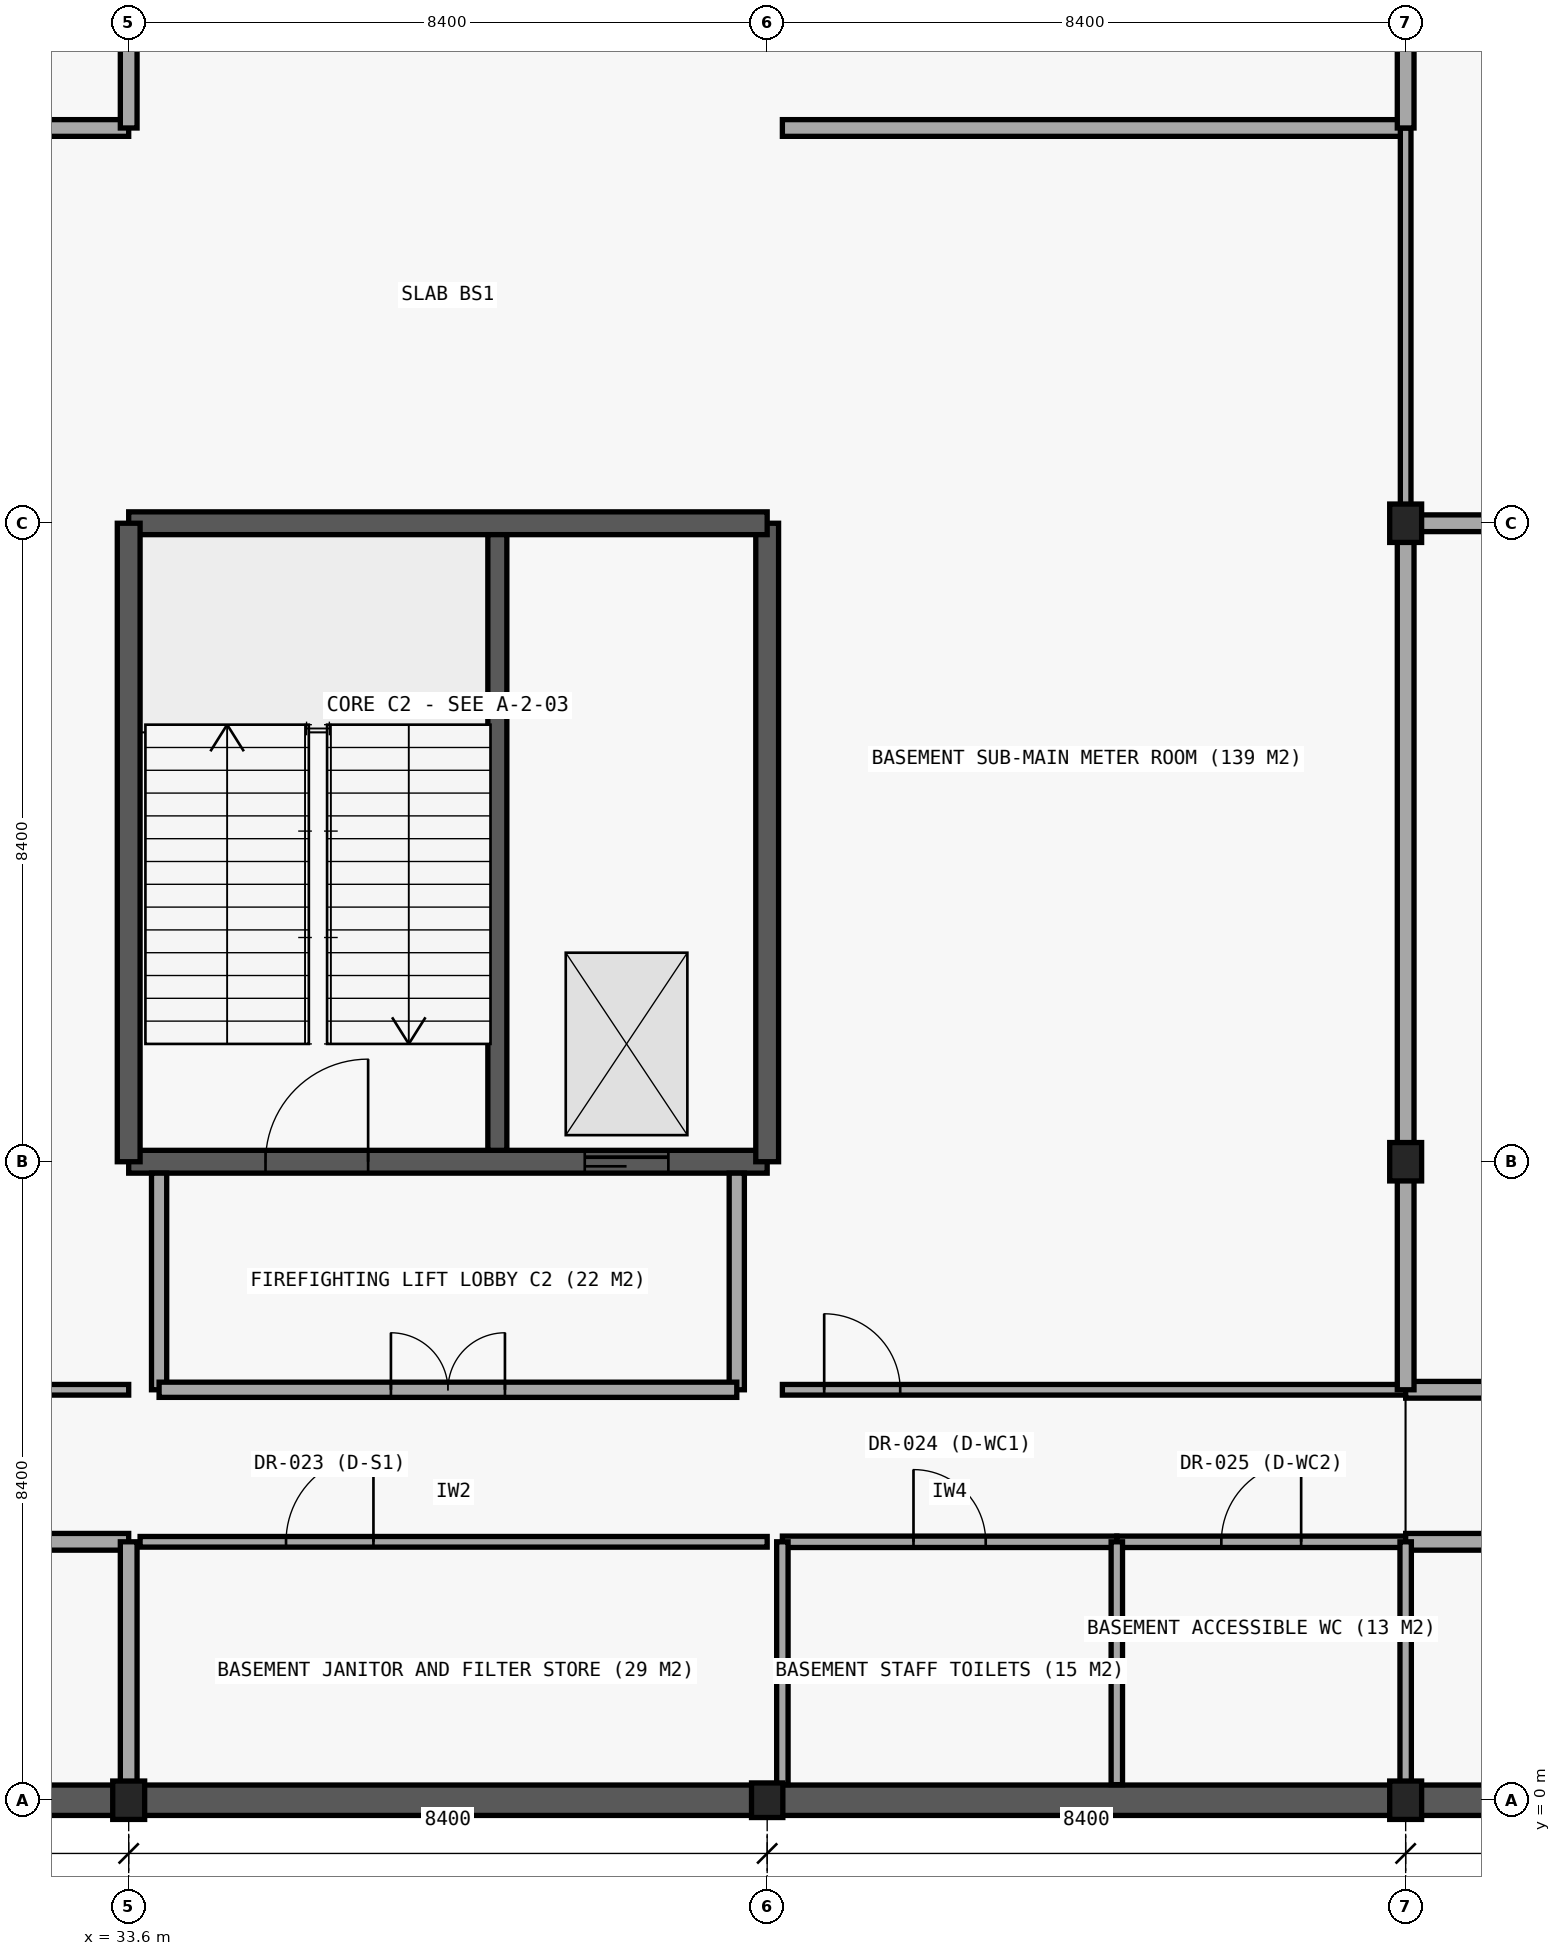
"""IFC4 building model, lengths in metres.
Left out: names, types, materials, properties, quantities, classifications, styles, units other than length and angle.
Written with IfcOpenShell. Run it as: python <this file> out.ifc"""

import sys

from ifc_helpers import new_model, si_unit, direction, frame, frame_2d, origin, origin_2d, place, context, subcontext, project, spatial, rectangle, i_section, extrude, element, fill, save


model = new_model("IFC4")
c1 = context("Model", 3, precision=1e-05, world=origin(), true_north=direction((0.0, 1.0)))
c2 = subcontext(c1, "Body", "Model", "MODEL_VIEW")
j1 = project(units=[si_unit("LENGTHUNIT", "METRE"), si_unit("PLANEANGLEUNIT", "RADIAN")], contexts=[c1])
p1 = place(None, origin())
s1 = spatial("IfcSite", under=j1, at=p1, CompositionType="ELEMENT")
p2 = place(p1, origin())
s2 = spatial("IfcBuilding", under=s1, at=p2, CompositionType="ELEMENT")
p3 = place(p2, frame((0.0, 0.0, -4.5)))
s3 = spatial("IfcBuildingStorey", under=s2, at=p3, CompositionType="ELEMENT", Elevation=-4.5)
p4 = place(p3, frame((33.6, 8.4, -0.35), z_axis=(0.0, 0.0, 1.0), x_axis=(1.0, 0.0, 0.0)))
e1 = element("IfcWall", 1, at=p4, inside=s3, PredefinedType="SHEAR", context=c2, shape_type="SweptSolid", body=[
    extrude(rectangle(XDim=8.4, YDim=0.3, at=frame_2d((4.2, 0.0))), origin(), (0.0, 0.0, 1.0), 4.85),
])
p5 = place(p4, frame((1.8, 0.0, 0.35)))
e2 = element("IfcOpeningElement", 2, at=p5, cuts=e1, PredefinedType="OPENING", context=c2, shape_type="SweptSolid", body=[
    extrude(rectangle(XDim=1.35, YDim=2.2, at=frame_2d((0.675, 1.1))), frame((0.0, 0.16, 0.0), z_axis=(0.0, -1.0, 0.0), x_axis=(1.0, 0.0, 0.0)), (0.0, 0.0, 1.0), 0.32),
])
p6 = place(p4, frame((6.0, 0.0, 0.35)))
e3 = element("IfcOpeningElement", 3, at=p6, cuts=e1, PredefinedType="OPENING", context=c2, shape_type="SweptSolid", body=[
    extrude(rectangle(XDim=1.1, YDim=2.2, at=frame_2d((0.55, 1.1))), frame((0.0, 0.16, 0.0), z_axis=(0.0, -1.0, 0.0), x_axis=(1.0, 0.0, 0.0)), (0.0, 0.0, 1.0), 0.32),
])
p7 = place(p3, frame((42.0, 8.4, -0.35), z_axis=(0.0, 0.0, 1.0), x_axis=(0.0, 1.0, 0.0)))
e4 = element("IfcWall", 4, at=p7, inside=s3, PredefinedType="SHEAR", context=c2, shape_type="SweptSolid", body=[
    extrude(rectangle(XDim=8.4, YDim=0.3, at=frame_2d((4.2, 0.0))), origin(), (0.0, 0.0, 1.0), 4.85),
])
p8 = place(p3, frame((42.0, 16.8, -0.35), z_axis=(0.0, 0.0, 1.0), x_axis=(-1.0, 0.0, 0.0)))
e5 = element("IfcWall", 5, at=p8, inside=s3, PredefinedType="SHEAR", context=c2, shape_type="SweptSolid", body=[
    extrude(rectangle(XDim=8.4, YDim=0.3, at=frame_2d((4.2, 0.0))), origin(), (0.0, 0.0, 1.0), 4.85),
])
p9 = place(p3, frame((33.6, 16.8, -0.35), z_axis=(0.0, 0.0, 1.0), x_axis=(0.0, -1.0, 0.0)))
e6 = element("IfcWall", 6, at=p9, inside=s3, PredefinedType="SHEAR", context=c2, shape_type="SweptSolid", body=[
    extrude(rectangle(XDim=8.4, YDim=0.3, at=frame_2d((4.2, 0.0))), origin(), (0.0, 0.0, 1.0), 4.85),
])
p10 = place(p3, frame((38.45, 8.55, -0.35), z_axis=(0.0, 0.0, 1.0), x_axis=(0.0, 1.0, 0.0)))
e7 = element("IfcWall", 7, at=p10, inside=s3, PredefinedType="SHEAR", context=c2, shape_type="SweptSolid", body=[
    extrude(rectangle(XDim=8.1, YDim=0.25, at=frame_2d((4.05, 0.0))), origin(), (0.0, 0.0, 1.0), 4.85),
])
p11 = place(p3, frame((25.2, 0.0, -0.35), z_axis=(0.0, 0.0, 1.0), x_axis=(1.0, 0.0, 0.0)))
e8 = element("IfcWall", 8, at=p11, inside=s3, PredefinedType="SOLIDWALL", context=c2, shape_type="SweptSolid", body=[
    extrude(rectangle(XDim=8.4, YDim=0.4, at=frame_2d((4.2, 0.0))), origin(), (0.0, 0.0, 1.0), 4.6),
])
for number, where, z_axis, x_axis in (
    (9, (33.6, 0.0, -0.35), (0.0, 0.0, 1.0), (1.0, 0.0, 0.0)),
    (10, (42.0, 0.0, -0.35), (0.0, 0.0, 1.0), (1.0, 0.0, 0.0)),
):
    element("IfcWall", number, at=place(p3, frame(where, z_axis=z_axis, x_axis=x_axis)), inside=s3, PredefinedType="SOLIDWALL", context=c2, shape_type="SweptSolid", body=[
        extrude(rectangle(XDim=8.4, YDim=0.4, at=frame_2d((4.2, 0.0))), origin(), (0.0, 0.0, 1.0), 4.6),
    ])
p12 = place(p3, frame((50.4, 0.0, -0.35), z_axis=(0.0, 0.0, 1.0), x_axis=(1.0, 0.0, 0.0)))
e11 = element("IfcWall", 11, at=p12, inside=s3, PredefinedType="SOLIDWALL", context=c2, shape_type="SweptSolid", body=[
    extrude(rectangle(XDim=8.4, YDim=0.4, at=frame_2d((4.2, 0.0))), origin(), (0.0, 0.0, 1.0), 4.6),
])
p13 = place(p3, frame((33.6, 0.0, -0.35), z_axis=(0.0, 0.0, 1.0), x_axis=(1.0, 0.0, 0.0)))
e12 = element("IfcColumn", 12, at=p13, inside=s3, PredefinedType="COLUMN", context=c2, shape_type="SweptSolid", body=[
    extrude(i_section(OverallWidth=0.42, OverallDepth=0.505, WebThickness=0.037, FlangeThickness=0.059, FilletRadius=0.015, at=origin_2d()), origin(), (0.0, 0.0, 1.0), 4.85),
])
p14 = place(p3, frame((42.0, 0.0, -0.35), z_axis=(0.0, 0.0, 1.0), x_axis=(1.0, 0.0, 0.0)))
e13 = element("IfcColumn", 13, at=p14, inside=s3, PredefinedType="COLUMN", context=c2, shape_type="SweptSolid", body=[
    extrude(i_section(OverallWidth=0.412, OverallDepth=0.455, WebThickness=0.031, FlangeThickness=0.049, FilletRadius=0.015, at=origin_2d()), origin(), (0.0, 0.0, 1.0), 4.85),
])
for number, where, z_axis, x_axis in (
    (14, (50.4, 0.0, -0.35), (0.0, 0.0, 1.0), (1.0, 0.0, 0.0)),
    (15, (50.4, 8.4, -0.35), (0.0, 0.0, 1.0), (1.0, 0.0, 0.0)),
    (16, (50.4, 16.8, -0.35), (0.0, 0.0, 1.0), (1.0, 0.0, 0.0)),
):
    element("IfcColumn", number, at=place(p3, frame(where, z_axis=z_axis, x_axis=x_axis)), inside=s3, PredefinedType="COLUMN", context=c2, shape_type="SweptSolid", body=[
        extrude(i_section(OverallWidth=0.42, OverallDepth=0.505, WebThickness=0.037, FlangeThickness=0.059, FilletRadius=0.015, at=origin_2d()), origin(), (0.0, 0.0, 1.0), 4.85),
    ])
for number, where, z_axis, x_axis in (
    (17, (34.0, 5.4, 0.0), (0.0, 0.0, 1.0), (0.0, 1.0, 0.0)),
    (18, (41.6, 5.4, 0.0), (0.0, 0.0, 1.0), (0.0, 1.0, 0.0)),
):
    element("IfcWall", number, at=place(p3, frame(where, z_axis=z_axis, x_axis=x_axis)), inside=s3, PredefinedType="PARTITIONING", context=c2, shape_type="SweptSolid", body=[
        extrude(rectangle(XDim=2.85, YDim=0.2, at=frame_2d((1.425, 0.0))), origin(), (0.0, 0.0, 1.0), 3.75),
    ])
p15 = place(p3, frame((34.0, 5.4, 0.0), z_axis=(0.0, 0.0, 1.0), x_axis=(1.0, 0.0, 0.0)))
e19 = element("IfcWall", 19, at=p15, inside=s3, PredefinedType="PARTITIONING", context=c2, shape_type="SweptSolid", body=[
    extrude(rectangle(XDim=7.6, YDim=0.2, at=frame_2d((3.8, 0.0))), origin(), (0.0, 0.0, 1.0), 3.82),
])
p16 = place(p15, frame((3.05, 0.0, 0.0)))
e20 = element("IfcOpeningElement", 20, at=p16, cuts=e19, PredefinedType="OPENING", context=c2, shape_type="SweptSolid", body=[
    extrude(rectangle(XDim=1.5, YDim=2.2, at=frame_2d((0.75, 1.1))), frame((0.0, 0.11, 0.0), z_axis=(0.0, -1.0, 0.0), x_axis=(1.0, 0.0, 0.0)), (0.0, 0.0, 1.0), 0.22),
])
p17 = place(p3, frame((20.0, 3.4, 0.0), z_axis=(0.0, 0.0, 1.0), x_axis=(1.0, 0.0, 0.0)))
e21 = element("IfcWall", 21, at=p17, inside=s3, PredefinedType="PARTITIONING", context=c2, shape_type="SweptSolid", body=[
    extrude(rectangle(XDim=13.6, YDim=0.22, at=frame_2d((6.8, 0.0))), origin(), (0.0, 0.0, 1.0), 3.8),
])
p18 = place(p17, frame((6.175, 0.0, 0.0)))
e22 = element("IfcOpeningElement", 22, at=p18, cuts=e21, PredefinedType="OPENING", context=c2, shape_type="SweptSolid", body=[
    extrude(rectangle(XDim=1.25, YDim=2.2, at=frame_2d((0.625, 1.1))), frame((0.0, 0.12, 0.0), z_axis=(0.0, -1.0, 0.0), x_axis=(1.0, 0.0, 0.0)), (0.0, 0.0, 1.0), 0.24),
])
p19 = place(p3, frame((33.75, 3.4, 0.0), z_axis=(0.0, 0.0, 1.0), x_axis=(1.0, 0.0, 0.0)))
e23 = element("IfcWall", 23, at=p19, inside=s3, PredefinedType="PARTITIONING", context=c2, shape_type="SweptSolid", body=[
    extrude(rectangle(XDim=8.25, YDim=0.14, at=frame_2d((4.125, 0.0))), origin(), (0.0, 0.0, 1.0), 3.8),
])
p20 = place(p19, frame((1.92, 0.0, 0.0)))
e24 = element("IfcOpeningElement", 24, at=p20, cuts=e23, PredefinedType="OPENING", context=c2, shape_type="SweptSolid", body=[
    extrude(rectangle(XDim=1.15, YDim=2.15, at=frame_2d((0.575, 1.075))), frame((0.0, 0.08, 0.0), z_axis=(0.0, -1.0, 0.0), x_axis=(1.0, 0.0, 0.0)), (0.0, 0.0, 1.0), 0.16),
])
p21 = place(p3, frame((42.2, 3.4, 0.0), z_axis=(0.0, 0.0, 1.0), x_axis=(1.0, 0.0, 0.0)))
e25 = element("IfcWall", 25, at=p21, inside=s3, PredefinedType="PARTITIONING", context=c2, shape_type="SweptSolid", body=[
    extrude(rectangle(XDim=4.4, YDim=0.15, at=frame_2d((2.2, 0.0))), origin(), (0.0, 0.0, 1.0), 3.8),
])
p22 = place(p21, frame((1.725, 0.0, 0.0)))
e26 = element("IfcOpeningElement", 26, at=p22, cuts=e25, PredefinedType="OPENING", context=c2, shape_type="SweptSolid", body=[
    extrude(rectangle(XDim=0.95, YDim=2.1, at=frame_2d((0.475, 1.05))), frame((0.0, 0.085, 0.0), z_axis=(0.0, -1.0, 0.0), x_axis=(1.0, 0.0, 0.0)), (0.0, 0.0, 1.0), 0.17),
])
p23 = place(p3, frame((46.6, 3.4, 0.0), z_axis=(0.0, 0.0, 1.0), x_axis=(1.0, 0.0, 0.0)))
e27 = element("IfcWall", 27, at=p23, inside=s3, PredefinedType="PARTITIONING", context=c2, shape_type="SweptSolid", body=[
    extrude(rectangle(XDim=3.8, YDim=0.15, at=frame_2d((1.9, 0.0))), origin(), (0.0, 0.0, 1.0), 3.8),
])
p24 = place(p23, frame((1.375, 0.0, 0.0)))
e28 = element("IfcOpeningElement", 28, at=p24, cuts=e27, PredefinedType="OPENING", context=c2, shape_type="SweptSolid", body=[
    extrude(rectangle(XDim=1.05, YDim=2.15, at=frame_2d((0.525, 1.075))), frame((0.0, 0.085, 0.0), z_axis=(0.0, -1.0, 0.0), x_axis=(1.0, 0.0, 0.0)), (0.0, 0.0, 1.0), 0.17),
])
p25 = place(p3, frame((50.4, 3.4, 0.0), z_axis=(0.0, 0.0, 1.0), x_axis=(1.0, 0.0, 0.0)))
e29 = element("IfcWall", 29, at=p25, inside=s3, PredefinedType="PARTITIONING", context=c2, shape_type="SweptSolid", body=[
    extrude(rectangle(XDim=8.55, YDim=0.22, at=frame_2d((4.275, 0.0))), origin(), (0.0, 0.0, 1.0), 3.8),
])
p26 = place(p3, frame((22.2, 5.4, 0.0), z_axis=(0.0, 0.0, 1.0), x_axis=(1.0, 0.0, 0.0)))
e30 = element("IfcWall", 30, at=p26, inside=s3, PredefinedType="PARTITIONING", context=c2, shape_type="SweptSolid", body=[
    extrude(rectangle(XDim=11.4, YDim=0.14, at=frame_2d((5.7, 0.0))), origin(), (0.0, 0.0, 1.0), 3.8),
])
p27 = place(p26, frame((5.125, 0.0, 0.0)))
e31 = element("IfcOpeningElement", 31, at=p27, cuts=e30, PredefinedType="OPENING", context=c2, shape_type="SweptSolid", body=[
    extrude(rectangle(XDim=1.15, YDim=2.15, at=frame_2d((0.575, 1.075))), frame((0.0, 0.08, 0.0), z_axis=(0.0, -1.0, 0.0), x_axis=(1.0, 0.0, 0.0)), (0.0, 0.0, 1.0), 0.16),
])
p28 = place(p3, frame((42.2, 5.4, 0.0), z_axis=(0.0, 0.0, 1.0), x_axis=(1.0, 0.0, 0.0)))
e32 = element("IfcWall", 32, at=p28, inside=s3, PredefinedType="PARTITIONING", context=c2, shape_type="SweptSolid", body=[
    extrude(rectangle(XDim=8.2, YDim=0.14, at=frame_2d((4.1, 0.0))), origin(), (0.0, 0.0, 1.0), 3.8),
])
p29 = place(p28, frame((0.55, 0.0, 0.0)))
e33 = element("IfcOpeningElement", 33, at=p29, cuts=e32, PredefinedType="OPENING", context=c2, shape_type="SweptSolid", body=[
    extrude(rectangle(XDim=1.0, YDim=2.15, at=frame_2d((0.5, 1.075))), frame((0.0, 0.08, 0.0), z_axis=(0.0, -1.0, 0.0), x_axis=(1.0, 0.0, 0.0)), (0.0, 0.0, 1.0), 0.16),
])
p30 = place(p3, frame((50.4, 5.4, 0.0), z_axis=(0.0, 0.0, 1.0), x_axis=(1.0, 0.0, 0.0)))
e34 = element("IfcWall", 34, at=p30, inside=s3, PredefinedType="PARTITIONING", context=c2, shape_type="SweptSolid", body=[
    extrude(rectangle(XDim=8.55, YDim=0.22, at=frame_2d((4.275, 0.0))), origin(), (0.0, 0.0, 1.0), 3.79),
])
p31 = place(p3, frame((50.4, 16.8, 0.0), z_axis=(0.0, 0.0, 1.0), x_axis=(1.0, 0.0, 0.0)))
e35 = element("IfcWall", 35, at=p31, inside=s3, PredefinedType="PARTITIONING", context=c2, shape_type="SweptSolid", body=[
    extrude(rectangle(XDim=8.55, YDim=0.22, at=frame_2d((4.275, 0.0))), origin(), (0.0, 0.0, 1.0), 2.77),
])
p32 = place(p3, frame((22.2, 22.0, 0.0), z_axis=(0.0, 0.0, 1.0), x_axis=(1.0, 0.0, 0.0)))
e36 = element("IfcWall", 36, at=p32, inside=s3, PredefinedType="PARTITIONING", context=c2, shape_type="SweptSolid", body=[
    extrude(rectangle(XDim=11.4, YDim=0.22, at=frame_2d((5.7, 0.0))), origin(), (0.0, 0.0, 1.0), 3.8),
])
p33 = place(p3, frame((42.2, 22.0, 0.0), z_axis=(0.0, 0.0, 1.0), x_axis=(1.0, 0.0, 0.0)))
e37 = element("IfcWall", 37, at=p33, inside=s3, PredefinedType="PARTITIONING", context=c2, shape_type="SweptSolid", body=[
    extrude(rectangle(XDim=8.2, YDim=0.22, at=frame_2d((4.1, 0.0))), origin(), (0.0, 0.0, 1.0), 3.8),
])
p34 = place(p3, frame((33.6, 0.205, 0.0), z_axis=(0.0, 0.0, 1.0), x_axis=(0.0, 1.0, 0.0)))
e38 = element("IfcWall", 38, at=p34, inside=s3, PredefinedType="PARTITIONING", context=c2, shape_type="SweptSolid", body=[
    extrude(rectangle(XDim=3.195, YDim=0.22, at=frame_2d((1.597, 0.0))), origin(), (0.0, 0.0, 1.0), 3.75),
])
p35 = place(p3, frame((33.6, 22.0, 0.0), z_axis=(0.0, 0.0, 1.0), x_axis=(0.0, 1.0, 0.0)))
e39 = element("IfcWall", 39, at=p35, inside=s3, PredefinedType="PARTITIONING", context=c2, shape_type="SweptSolid", body=[
    extrude(rectangle(XDim=20.0, YDim=0.22, at=frame_2d((10.0, 0.0))), origin(), (0.0, 0.0, 1.0), 3.75),
])
p36 = place(p35, frame((5.42, 0.0, 0.0)))
e40 = element("IfcOpeningElement", 40, at=p36, cuts=e39, PredefinedType="OPENING", context=c2, shape_type="SweptSolid", body=[
    extrude(rectangle(XDim=1.25, YDim=2.2, at=frame_2d((0.625, 1.1))), frame((0.0, 0.12, 0.0), z_axis=(0.0, -1.0, 0.0), x_axis=(1.0, 0.0, 0.0)), (0.0, 0.0, 1.0), 0.24),
])
p37 = place(p3, frame((42.2, 0.205, 0.0), z_axis=(0.0, 0.0, 1.0), x_axis=(0.0, 1.0, 0.0)))
e41 = element("IfcWall", 41, at=p37, inside=s3, PredefinedType="PARTITIONING", context=c2, shape_type="SweptSolid", body=[
    extrude(rectangle(XDim=3.195, YDim=0.15, at=frame_2d((1.597, 0.0))), origin(), (0.0, 0.0, 1.0), 3.75),
])
for number, where, z_axis, x_axis in (
    (42, (46.6, 0.205, 0.0), (0.0, 0.0, 1.0), (0.0, 1.0, 0.0)),
    (43, (50.4, 0.205, 0.0), (0.0, 0.0, 1.0), (0.0, 1.0, 0.0)),
):
    element("IfcWall", number, at=place(p3, frame(where, z_axis=z_axis, x_axis=x_axis)), inside=s3, PredefinedType="PARTITIONING", context=c2, shape_type="SweptSolid", body=[
        extrude(rectangle(XDim=3.195, YDim=0.15, at=frame_2d((1.597, 0.0))), origin(), (0.0, 0.0, 1.0), 3.8),
    ])
p38 = place(p3, frame((50.4, 5.4, 0.0), z_axis=(0.0, 0.0, 1.0), x_axis=(0.0, 1.0, 0.0)))
e44 = element("IfcWall", 44, at=p38, inside=s3, PredefinedType="PARTITIONING", context=c2, shape_type="SweptSolid", body=[
    extrude(rectangle(XDim=11.25, YDim=0.22, at=frame_2d((5.625, 0.0))), origin(), (0.0, 0.0, 1.0), 3.8),
])
p39 = place(p3, frame((50.4, 16.95, 0.0), z_axis=(0.0, 0.0, 1.0), x_axis=(0.0, 1.0, 0.0)))
e45 = element("IfcWall", 45, at=p39, inside=s3, PredefinedType="PARTITIONING", context=c2, shape_type="SweptSolid", body=[
    extrude(rectangle(XDim=5.05, YDim=0.14, at=frame_2d((2.525, 0.0))), origin(), (0.0, 0.0, 1.0), 3.8),
])
p40 = place(p3, frame((50.4, 22.0, 0.0), z_axis=(0.0, 0.0, 1.0), x_axis=(0.0, 1.0, 0.0)))
e46 = element("IfcWall", 46, at=p40, inside=s3, PredefinedType="PARTITIONING", context=c2, shape_type="SweptSolid", body=[
    extrude(rectangle(XDim=11.42, YDim=0.22, at=frame_2d((5.71, 0.0))), origin(), (0.0, 0.0, 1.0), 3.8),
])
p41 = place(p5, origin())
e47 = element("IfcDoor", 47, at=p41, inside=s3, OperationType="SINGLE_SWING_RIGHT", PredefinedType="DOOR", context=c2, shape_type="SweptSolid", body=[
    extrude(rectangle(XDim=1.35, YDim=2.2, at=frame_2d((0.675, 1.1))), frame((0.0, 0.025, 0.0), z_axis=(0.0, -1.0, 0.0), x_axis=(1.0, 0.0, 0.0)), (0.0, 0.0, 1.0), 0.05),
])
fill(e2, e47)
p42 = place(p6, origin())
e48 = element("IfcDoor", 48, at=p42, inside=s3, OperationType="SLIDING_TO_LEFT", PredefinedType="DOOR", context=c2, shape_type="SweptSolid", body=[
    extrude(rectangle(XDim=1.1, YDim=2.2, at=frame_2d((0.55, 1.1))), frame((0.0, 0.025, 0.0), z_axis=(0.0, -1.0, 0.0), x_axis=(1.0, 0.0, 0.0)), (0.0, 0.0, 1.0), 0.05),
])
fill(e3, e48)
p43 = place(p16, origin())
e49 = element("IfcDoor", 49, at=p43, inside=s3, OperationType="DOUBLE_DOOR_SINGLE_SWING", PredefinedType="DOOR", context=c2, shape_type="SweptSolid", body=[
    extrude(rectangle(XDim=1.5, YDim=2.2, at=frame_2d((0.75, 1.1))), frame((0.0, 0.025, 0.0), z_axis=(0.0, -1.0, 0.0), x_axis=(1.0, 0.0, 0.0)), (0.0, 0.0, 1.0), 0.05),
])
fill(e20, e49)
p44 = place(p20, origin())
e50 = element("IfcDoor", 50, at=p44, inside=s3, OperationType="SINGLE_SWING_RIGHT", PredefinedType="DOOR", context=c2, shape_type="SweptSolid", body=[
    extrude(rectangle(XDim=1.15, YDim=2.15, at=frame_2d((0.575, 1.075))), frame((0.0, 0.025, 0.0), z_axis=(0.0, -1.0, 0.0), x_axis=(1.0, 0.0, 0.0)), (0.0, 0.0, 1.0), 0.05),
])
fill(e24, e50)
p45 = place(p22, origin())
e51 = element("IfcDoor", 51, at=p45, inside=s3, OperationType="SINGLE_SWING_LEFT", PredefinedType="DOOR", context=c2, shape_type="SweptSolid", body=[
    extrude(rectangle(XDim=0.95, YDim=2.1, at=frame_2d((0.475, 1.05))), frame((0.0, 0.025, 0.0), z_axis=(0.0, -1.0, 0.0), x_axis=(1.0, 0.0, 0.0)), (0.0, 0.0, 1.0), 0.05),
])
fill(e26, e51)
p46 = place(p24, origin())
e52 = element("IfcDoor", 52, at=p46, inside=s3, OperationType="SINGLE_SWING_RIGHT", PredefinedType="DOOR", context=c2, shape_type="SweptSolid", body=[
    extrude(rectangle(XDim=1.05, YDim=2.15, at=frame_2d((0.525, 1.075))), frame((0.0, 0.025, 0.0), z_axis=(0.0, -1.0, 0.0), x_axis=(1.0, 0.0, 0.0)), (0.0, 0.0, 1.0), 0.05),
])
fill(e28, e52)
p47 = place(p29, origin())
e53 = element("IfcDoor", 53, at=p47, inside=s3, OperationType="SINGLE_SWING_LEFT", PredefinedType="DOOR", context=c2, shape_type="SweptSolid", body=[
    extrude(rectangle(XDim=1.0, YDim=2.15, at=frame_2d((0.5, 1.075))), frame((0.0, 0.025, 0.0), z_axis=(0.0, -1.0, 0.0), x_axis=(1.0, 0.0, 0.0)), (0.0, 0.0, 1.0), 0.05),
])
fill(e33, e53)
save(model, sys.argv[1])
